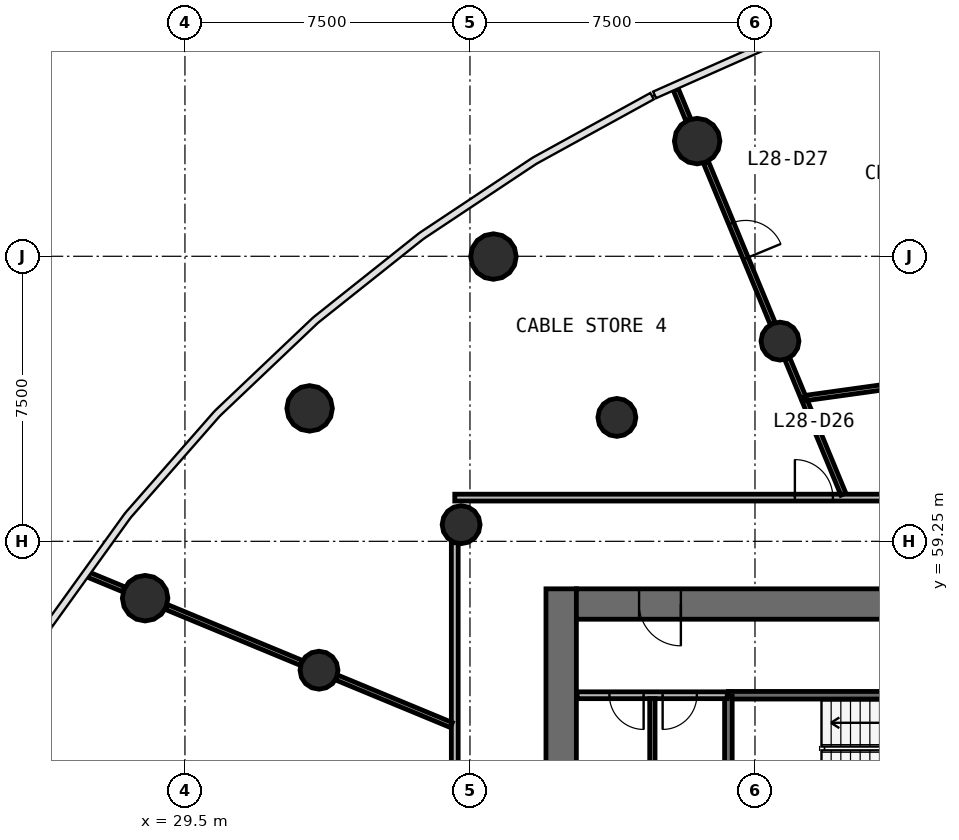
"""IFC4 building model, lengths in metres.
Left out: names, types, materials, properties, quantities, classifications, styles, units other than length and angle.
Written with IfcOpenShell. Run it as: python <this file> out.ifc"""

import sys

from ifc_helpers import new_model, si_unit, direction, frame, frame_2d, origin, origin_2d, place, context, subcontext, project, spatial, rectangle, circle, extrude, source, transform, mapped, element, fill, save


model = new_model("IFC4")
c1 = context("Model", 3, precision=1e-05, world=origin(), true_north=direction((0.0, 1.0)))
c2 = subcontext(c1, "Body", "Model", "MODEL_VIEW")
j1 = project(units=[si_unit("LENGTHUNIT", "METRE"), si_unit("PLANEANGLEUNIT", "RADIAN")], contexts=[c1])
p1 = place(None, origin())
s1 = spatial("IfcSite", under=j1, at=p1, CompositionType="ELEMENT")
p2 = place(p1, origin())
s2 = spatial("IfcBuilding", under=s1, at=p2, CompositionType="ELEMENT")
p3 = place(p2, frame((0.0, 0.0, 120.8)))
s3 = spatial("IfcBuildingStorey", under=s2, at=p3, CompositionType="ELEMENT", Elevation=120.8)
p4 = place(p3, frame((39.4, 58.0, 0.0), z_axis=(0.0, 0.0, 1.0), x_axis=(0.0, -1.0, 0.0)))
e1 = element("IfcWall", 1, at=p4, inside=s3, PredefinedType="SHEAR", context=c2, shape_type="SweptSolid", body=[
    extrude(rectangle(XDim=20.0, YDim=0.8, at=frame_2d((10.0, 0.0))), origin(), (0.0, 0.0, 1.0), 4.1),
])
p5 = place(p4, frame((9.1, 0.0, 0.0)))
e2 = element("IfcOpeningElement", 2, at=p5, cuts=e1, PredefinedType="OPENING", context=c2, shape_type="SweptSolid", body=[
    extrude(rectangle(XDim=1.8, YDim=2.1, at=frame_2d((0.9, 1.05))), frame((0.0, 0.41, 0.0), z_axis=(0.0, -1.0, 0.0), x_axis=(1.0, 0.0, 0.0)), (0.0, 0.0, 1.0), 0.82),
])
p6 = place(p3, frame((64.2, 57.6, 0.0), z_axis=(0.0, 0.0, 1.0), x_axis=(-1.0, 0.0, 0.0)))
e3 = element("IfcWall", 3, at=p6, inside=s3, PredefinedType="SHEAR", context=c2, shape_type="SweptSolid", body=[
    extrude(rectangle(XDim=24.4, YDim=0.8, at=frame_2d((12.2, 0.0))), origin(), (0.0, 0.0, 1.0), 4.1),
])
p7 = place(p6, frame((21.65, 0.0, 0.0)))
e4 = element("IfcOpeningElement", 4, at=p7, cuts=e3, PredefinedType="OPENING", context=c2, shape_type="SweptSolid", body=[
    extrude(rectangle(XDim=1.1, YDim=2.1, at=frame_2d((0.55, 1.05))), frame((0.0, 0.41, 0.0), z_axis=(0.0, -1.0, 0.0), x_axis=(1.0, 0.0, 0.0)), (0.0, 0.0, 1.0), 0.82),
])
p8 = place(p6, frame((2.15, 0.0, 0.0)))
e5 = element("IfcOpeningElement", 5, at=p8, cuts=e3, PredefinedType="OPENING", context=c2, shape_type="SweptSolid", body=[
    extrude(rectangle(XDim=1.1, YDim=2.1, at=frame_2d((0.55, 1.05))), frame((0.0, 0.41, 0.0), z_axis=(0.0, -1.0, 0.0), x_axis=(1.0, 0.0, 0.0)), (0.0, 0.0, 1.0), 0.82),
])
m1 = source(origin(), c2, "Body", "SweptSolid", [
    extrude(circle(Radius=0.6, at=origin_2d()), origin(), (0.0, 0.0, 1.0), 4.1),
])
for number, where, z_axis, x_axis in (
    (6, (42.978, 69.781, 0.0), (0.0, 0.0, 1.0), (1.0, 0.0, 0.0)),
    (7, (37.618, 66.743, 0.0), (0.0, 0.0, 1.0), (1.0, 0.0, 0.0)),
    (8, (32.78, 62.748, 0.0), (0.0, 0.0, 1.0), (1.0, 0.0, 0.0)),
    (9, (28.452, 57.754, 0.0), (0.0, 0.0, 1.0), (1.0, 0.0, 0.0)),
):
    element("IfcColumn", number, at=place(p3, frame(where, z_axis=z_axis, x_axis=x_axis)), inside=s3, PredefinedType="COLUMN", context=c2, shape_type="MappedRepresentation", body=[
        mapped(m1, transform((0.0, 0.0, 0.0), scale=1.0)),
    ])
m2 = source(origin(), c2, "Body", "SweptSolid", [
    extrude(circle(Radius=0.5, at=origin_2d()), origin(), (0.0, 0.0, 1.0), 4.1),
])
for number, where, z_axis, x_axis in (
    (10, (45.158, 64.518, 0.0), (0.0, 0.0, 1.0), (1.0, 0.0, 0.0)),
    (11, (40.866, 62.51, 0.0), (0.0, 0.0, 1.0), (1.0, 0.0, 0.0)),
    (12, (36.768, 59.688, 0.0), (0.0, 0.0, 1.0), (1.0, 0.0, 0.0)),
    (13, (33.028, 55.859, 0.0), (0.0, 0.0, 1.0), (1.0, 0.0, 0.0)),
):
    element("IfcColumn", number, at=place(p3, frame(where, z_axis=z_axis, x_axis=x_axis)), inside=s3, PredefinedType="COLUMN", context=c2, shape_type="MappedRepresentation", body=[
        mapped(m2, transform((0.0, 0.0, 0.0), scale=1.0)),
    ])
p9 = place(p3, frame((50.4, 55.2, 0.0), z_axis=(0.0, 0.0, 1.0), x_axis=(-1.0, 0.0, 0.0)))
e14 = element("IfcWall", 14, at=p9, inside=s3, PredefinedType="SOLIDWALL", context=c2, shape_type="SweptSolid", body=[
    extrude(rectangle(XDim=6.6, YDim=0.2, at=frame_2d((3.3, 0.0))), origin(), (0.0, 0.0, 1.0), 3.7),
])
p10 = place(p9, frame((0.3, 0.0, 0.0)))
e15 = element("IfcOpeningElement", 15, at=p10, cuts=e14, PredefinedType="OPENING", context=c2, shape_type="SweptSolid", body=[
    extrude(rectangle(XDim=1.2, YDim=2.1, at=frame_2d((0.6, 1.05))), frame((0.0, 0.11, 0.0), z_axis=(0.0, -1.0, 0.0), x_axis=(1.0, 0.0, 0.0)), (0.0, 0.0, 1.0), 0.22),
])
p11 = place(p3, frame((43.8, 55.17, 0.0), z_axis=(0.0, 0.0, 1.0), x_axis=(0.0, -1.0, 0.0)))
e16 = element("IfcWall", 16, at=p11, inside=s3, PredefinedType="SOLIDWALL", context=c2, shape_type="SweptSolid", body=[
    extrude(rectangle(XDim=2.14, YDim=0.2, at=frame_2d((1.07, 0.0))), origin(), (0.0, 0.0, 1.0), 3.7),
])
p12 = place(p3, frame((36.6, 60.4, 0.0), z_axis=(0.0, 0.0, 1.0), x_axis=(1.0, 0.0, 0.0)))
e17 = element("IfcWall", 17, at=p12, inside=s3, PredefinedType="PARTITIONING", context=c2, shape_type="SweptSolid", body=[
    extrude(rectangle(XDim=30.8, YDim=0.18, at=frame_2d((15.4, 0.0))), origin(), (0.0, 0.0, 1.0), 2.9),
])
p13 = place(p12, frame((14.85, 0.0, 0.0)))
e18 = element("IfcOpeningElement", 18, at=p13, cuts=e17, PredefinedType="OPENING", context=c2, shape_type="SweptSolid", body=[
    extrude(rectangle(XDim=0.9, YDim=2.1, at=frame_2d((0.45, 1.05))), frame((0.0, 0.1, 0.0), z_axis=(0.0, -1.0, 0.0), x_axis=(1.0, 0.0, 0.0)), (0.0, 0.0, 1.0), 0.2),
])
p14 = place(p12, frame((12.65, 0.0, 0.0)))
e19 = element("IfcOpeningElement", 19, at=p14, cuts=e17, PredefinedType="OPENING", context=c2, shape_type="SweptSolid", body=[
    extrude(rectangle(XDim=0.9, YDim=2.1, at=frame_2d((0.45, 1.05))), frame((0.0, 0.1, 0.0), z_axis=(0.0, -1.0, 0.0), x_axis=(1.0, 0.0, 0.0)), (0.0, 0.0, 1.0), 0.2),
])
p15 = place(p12, frame((8.95, 0.0, 0.0)))
e20 = element("IfcOpeningElement", 20, at=p15, cuts=e17, PredefinedType="OPENING", context=c2, shape_type="SweptSolid", body=[
    extrude(rectangle(XDim=1.0, YDim=2.1, at=frame_2d((0.5, 1.05))), frame((0.0, 0.1, 0.0), z_axis=(0.0, -1.0, 0.0), x_axis=(1.0, 0.0, 0.0)), (0.0, 0.0, 1.0), 0.2),
])
p16 = place(p12, frame((17.35, 0.0, 0.0)))
e21 = element("IfcOpeningElement", 21, at=p16, cuts=e17, PredefinedType="OPENING", context=c2, shape_type="SweptSolid", body=[
    extrude(rectangle(XDim=1.0, YDim=2.1, at=frame_2d((0.5, 1.05))), frame((0.0, 0.1, 0.0), z_axis=(0.0, -1.0, 0.0), x_axis=(1.0, 0.0, 0.0)), (0.0, 0.0, 1.0), 0.2),
])
p17 = place(p3, frame((36.6, 35.63, 0.0), z_axis=(0.0, 0.0, 1.0), x_axis=(0.0, 1.0, 0.0)))
e22 = element("IfcWall", 22, at=p17, inside=s3, PredefinedType="PARTITIONING", context=c2, shape_type="SweptSolid", body=[
    extrude(rectangle(XDim=23.583, YDim=0.18, at=frame_2d((11.791, 0.0))), origin(), (0.0, 0.0, 1.0), 2.9),
])
p18 = place(p17, frame((11.333, 0.0, 0.0)))
e23 = element("IfcOpeningElement", 23, at=p18, cuts=e22, PredefinedType="OPENING", context=c2, shape_type="SweptSolid", body=[
    extrude(rectangle(XDim=1.0, YDim=2.1, at=frame_2d((0.5, 1.05))), frame((0.0, 0.1, 0.0), z_axis=(0.0, -1.0, 0.0), x_axis=(1.0, 0.0, 0.0)), (0.0, 0.0, 1.0), 0.2),
])
p19 = place(p17, frame((4.532, 0.0, 0.0)))
e24 = element("IfcOpeningElement", 24, at=p19, cuts=e22, PredefinedType="OPENING", context=c2, shape_type="SweptSolid", body=[
    extrude(rectangle(XDim=1.0, YDim=2.1, at=frame_2d((0.5, 1.05))), frame((0.0, 0.1, 0.0), z_axis=(0.0, -1.0, 0.0), x_axis=(1.0, 0.0, 0.0)), (0.0, 0.0, 1.0), 0.2),
])
p20 = place(p3, frame((43.77, 55.2, 0.0), z_axis=(0.0, 0.0, 1.0), x_axis=(-1.0, 0.0, 0.0)))
e25 = element("IfcWall", 25, at=p20, inside=s3, PredefinedType="PARTITIONING", context=c2, shape_type="SweptSolid", body=[
    extrude(rectangle(XDim=3.95, YDim=0.18, at=frame_2d((1.975, 0.0))), origin(), (0.0, 0.0, 1.0), 3.7),
])
p21 = place(p20, frame((2.2, 0.0, 0.0)))
e26 = element("IfcOpeningElement", 26, at=p21, cuts=e25, PredefinedType="OPENING", context=c2, shape_type="SweptSolid", body=[
    extrude(rectangle(XDim=0.9, YDim=2.1, at=frame_2d((0.45, 1.05))), frame((0.0, 0.1, 0.0), z_axis=(0.0, -1.0, 0.0), x_axis=(1.0, 0.0, 0.0)), (0.0, 0.0, 1.0), 0.2),
])
p22 = place(p20, frame((0.8, 0.0, 0.0)))
e27 = element("IfcOpeningElement", 27, at=p22, cuts=e25, PredefinedType="OPENING", context=c2, shape_type="SweptSolid", body=[
    extrude(rectangle(XDim=0.9, YDim=2.1, at=frame_2d((0.45, 1.05))), frame((0.0, 0.1, 0.0), z_axis=(0.0, -1.0, 0.0), x_axis=(1.0, 0.0, 0.0)), (0.0, 0.0, 1.0), 0.2),
])
p23 = place(p3, frame((43.21, 69.222, 0.0), z_axis=(0.0, 0.0, 1.0), x_axis=(0.382705930348, -0.923870213221, 0.0)))
e28 = element("IfcWall", 28, at=p23, inside=s3, PredefinedType="PARTITIONING", context=c2, shape_type="SweptSolid", body=[
    extrude(rectangle(XDim=4.587, YDim=0.14, at=frame_2d((2.293, 0.0))), origin(), (0.0, 0.0, 1.0), 2.9),
])
p24 = place(p23, frame((1.737, 0.0, 0.0)))
e29 = element("IfcOpeningElement", 29, at=p24, cuts=e28, PredefinedType="OPENING", context=c2, shape_type="SweptSolid", body=[
    extrude(rectangle(XDim=1.0, YDim=2.1, at=frame_2d((0.5, 1.05))), frame((0.0, 0.08, 0.0), z_axis=(0.0, -1.0, 0.0), x_axis=(1.0, 0.0, 0.0)), (0.0, 0.0, 1.0), 0.16),
])
p25 = place(p3, frame((49.947, 63.593, 0.0), z_axis=(0.0, 0.0, 1.0), x_axis=(-0.990459508441, -0.137804071561, 0.0)))
e30 = element("IfcWall", 30, at=p25, inside=s3, PredefinedType="PARTITIONING", context=c2, shape_type="SweptSolid", body=[
    extrude(rectangle(XDim=4.206, YDim=0.14, at=frame_2d((2.103, 0.0))), origin(), (0.0, 0.0, 1.0), 2.9),
])
p26 = place(p3, frame((32.561, 56.052, 0.0), z_axis=(0.0, 0.0, 1.0), x_axis=(-0.923885171168, 0.38266981916, 0.0)))
e31 = element("IfcWall", 31, at=p26, inside=s3, PredefinedType="PARTITIONING", context=c2, shape_type="SweptSolid", body=[
    extrude(rectangle(XDim=3.842, YDim=0.14, at=frame_2d((1.921, 0.0))), origin(), (0.0, 0.0, 1.0), 2.9),
])
p27 = place(p3, frame((36.51, 54.416, 0.0), z_axis=(0.0, 0.0, 1.0), x_axis=(-0.923911109142, 0.382607190737, 0.0)))
e32 = element("IfcWall", 32, at=p27, inside=s3, PredefinedType="PARTITIONING", context=c2, shape_type="SweptSolid", body=[
    extrude(rectangle(XDim=3.264, YDim=0.14, at=frame_2d((1.632, 0.0))), origin(), (0.0, 0.0, 1.0), 2.9),
])
p28 = place(p3, frame((46.826, 60.49, 0.0), z_axis=(0.0, 0.0, 1.0), x_axis=(-0.382665323853, 0.923887033094, 0.0)))
e33 = element("IfcWall", 33, at=p28, inside=s3, PredefinedType="PARTITIONING", context=c2, shape_type="SweptSolid", body=[
    extrude(rectangle(XDim=2.659, YDim=0.14, at=frame_2d((1.33, 0.0))), origin(), (0.0, 0.0, 1.0), 2.9),
])
p29 = place(p3, frame((41.8, 53.1, 0.0), z_axis=(0.0, 0.0, 1.0), x_axis=(0.0, 1.0, 0.0)))
e34 = element("IfcWall", 34, at=p29, inside=s3, PredefinedType="PARTITIONING", context=c2, shape_type="SweptSolid", body=[
    extrude(rectangle(XDim=2.01, YDim=0.14, at=frame_2d((1.005, 0.0))), origin(), (0.0, 0.0, 1.0), 2.9),
])
p30 = place(p3, frame((45.77, 63.041, 0.0), z_axis=(0.0, 0.0, 1.0), x_axis=(-0.382647721552, 0.923894323606, 0.0)))
e35 = element("IfcWall", 35, at=p30, inside=s3, PredefinedType="PARTITIONING", context=c2, shape_type="SweptSolid", body=[
    extrude(rectangle(XDim=1.093, YDim=0.14, at=frame_2d((0.546, 0.0))), origin(), (0.0, 0.0, 1.0), 2.9),
])
p31 = place(p3, frame((27.893, 57.985, 0.0), z_axis=(0.0, 0.0, 1.0), x_axis=(-0.92388760878, 0.382663933945, 0.0)))
e36 = element("IfcWall", 36, at=p31, inside=s3, PredefinedType="PARTITIONING", context=c2, shape_type="SweptSolid", body=[
    extrude(rectangle(XDim=1.013, YDim=0.14, at=frame_2d((0.507, 0.0))), origin(), (0.0, 0.0, 1.0), 2.9),
])
p32 = place(p3, frame((42.747, 70.34, 0.0), z_axis=(0.0, 0.0, 1.0), x_axis=(-0.382764243687, 0.923846055225, 0.0)))
e37 = element("IfcWall", 37, at=p32, inside=s3, PredefinedType="PARTITIONING", context=c2, shape_type="SweptSolid", body=[
    extrude(rectangle(XDim=0.871, YDim=0.14, at=frame_2d((0.436, 0.0))), origin(), (0.0, 0.0, 1.0), 2.9),
])
m3 = source(origin(), c2, "Body", "SweptSolid", [
    extrude(rectangle(XDim=1.1, YDim=2.1, at=frame_2d((0.55, 1.05))), frame((0.0, 0.025, 0.0), z_axis=(0.0, -1.0, 0.0), x_axis=(1.0, 0.0, 0.0)), (0.0, 0.0, 1.0), 0.05),
])
p33 = place(p7, origin())
e38 = element("IfcDoor", 38, at=p33, inside=s3, OperationType="SINGLE_SWING_LEFT", PredefinedType="DOOR", context=c2, shape_type="MappedRepresentation", body=[
    mapped(m3, transform((0.0, 0.0, 0.0), scale=1.0)),
])
fill(e4, e38)
m4 = source(origin(), c2, "Body", "SweptSolid", [
    extrude(rectangle(XDim=1.0, YDim=2.1, at=frame_2d((0.5, 1.05))), frame((0.0, 0.025, 0.0), z_axis=(0.0, -1.0, 0.0), x_axis=(1.0, 0.0, 0.0)), (0.0, 0.0, 1.0), 0.05),
])
p34 = place(p15, origin())
e39 = element("IfcDoor", 39, at=p34, inside=s3, OperationType="SINGLE_SWING_LEFT", PredefinedType="DOOR", context=c2, shape_type="MappedRepresentation", body=[
    mapped(m4, transform((0.0, 0.0, 0.0), scale=1.0)),
])
fill(e20, e39)
p35 = place(p24, origin())
e40 = element("IfcDoor", 40, at=p35, inside=s3, OperationType="SINGLE_SWING_RIGHT", PredefinedType="DOOR", context=c2, shape_type="MappedRepresentation", body=[
    mapped(m4, transform((0.0, 0.0, 0.0), scale=1.0)),
])
fill(e29, e40)
m5 = source(origin(), c2, "Body", "SweptSolid", [
    extrude(rectangle(XDim=0.9, YDim=2.1, at=frame_2d((0.45, 1.05))), frame((0.0, 0.025, 0.0), z_axis=(0.0, -1.0, 0.0), x_axis=(1.0, 0.0, 0.0)), (0.0, 0.0, 1.0), 0.05),
])
p36 = place(p21, origin())
e41 = element("IfcDoor", 41, at=p36, inside=s3, OperationType="SINGLE_SWING_LEFT", PredefinedType="DOOR", context=c2, shape_type="MappedRepresentation", body=[
    mapped(m5, transform((0.0, 0.0, 0.0), scale=1.0)),
])
fill(e26, e41)
p37 = place(p22, origin())
e42 = element("IfcDoor", 42, at=p37, inside=s3, OperationType="SINGLE_SWING_RIGHT", PredefinedType="DOOR", context=c2, shape_type="MappedRepresentation", body=[
    mapped(m5, transform((0.0, 0.0, 0.0), scale=1.0)),
])
fill(e27, e42)
save(model, sys.argv[1])
